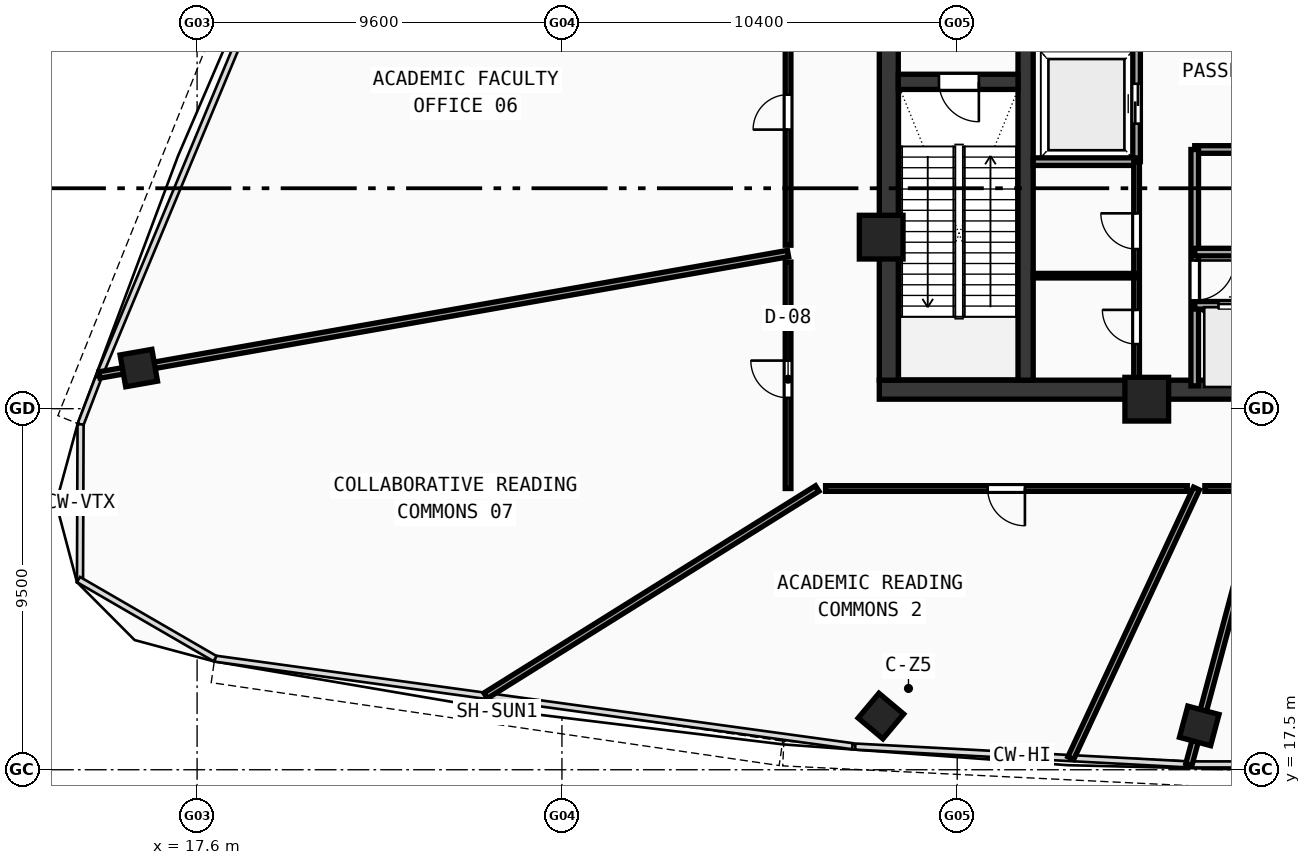
"""IFC4 building model, lengths in metres.
Left out: names, types, materials, properties, quantities, classifications, styles, units other than length and angle.
Written with IfcOpenShell. Run it as: python <this file> out.ifc"""

import sys

from ifc_helpers import new_model, si_unit, direction, frame, frame_2d, origin, origin_with_axes, origin_2d, place, context, subcontext, project, spatial, rectangle, hollow_rectangle, extrude, source, transform, mapped, element, fill, save


model = new_model("IFC4")
c1 = context("Model", 3, precision=1e-05, world=origin(), true_north=direction((0.0, 1.0)))
c2 = subcontext(c1, "Body", "Model", "MODEL_VIEW")
j1 = project(units=[si_unit("LENGTHUNIT", "METRE"), si_unit("PLANEANGLEUNIT", "RADIAN")], contexts=[c1])
p1 = place(None, origin())
s1 = spatial("IfcSite", under=j1, at=p1, CompositionType="ELEMENT")
p2 = place(p1, origin())
s2 = spatial("IfcBuilding", under=s1, at=p2, CompositionType="ELEMENT")
p3 = place(p2, frame((0.0, 0.0, 266.91)))
s3 = spatial("IfcBuildingStorey", under=s2, at=p3, CompositionType="ELEMENT", Elevation=266.91)
p4 = place(p3, frame((35.55, 27.5, 0.0), z_axis=(0.0, 0.0, 1.0), x_axis=(1.0, 0.0, 0.0)))
e1 = element("IfcWall", 1, at=p4, inside=s3, PredefinedType="SHEAR", context=c2, shape_type="SweptSolid", body=[
    extrude(rectangle(XDim=24.9, YDim=0.5, at=frame_2d((12.45, 0.0))), origin(), (0.0, 0.0, 1.0), 5.57),
])
p5 = place(p3, frame((35.8, 27.75, 0.0), z_axis=(0.0, 0.0, 1.0), x_axis=(0.0, 1.0, 0.0)))
e2 = element("IfcWall", 2, at=p5, inside=s3, PredefinedType="SHEAR", context=c2, shape_type="SweptSolid", body=[
    extrude(rectangle(XDim=12.2, YDim=0.5, at=frame_2d((6.1, 0.0))), origin(), (0.0, 0.0, 1.0), 5.57),
])
p6 = place(p3, frame((39.4, 27.75, 0.0), z_axis=(0.0, 0.0, 1.0), x_axis=(0.0, 1.0, 0.0)))
e3 = element("IfcWall", 3, at=p6, inside=s3, PredefinedType="SHEAR", context=c2, shape_type="SweptSolid", body=[
    extrude(rectangle(XDim=12.2, YDim=0.4, at=frame_2d((6.1, 0.0))), origin(), (0.0, 0.0, 1.0), 5.57),
])
p7 = place(p6, frame((10.0, 0.0, 0.0)))
e4 = element("IfcOpeningElement", 4, at=p7, cuts=e3, PredefinedType="OPENING", context=c2, shape_type="SweptSolid", body=[
    extrude(rectangle(XDim=1.1, YDim=2.1, at=frame_2d((0.55, 1.05))), frame((0.0, 0.21, 0.0), z_axis=(0.0, -1.0, 0.0), x_axis=(1.0, 0.0, 0.0)), (0.0, 0.0, 1.0), 0.42),
])
p8 = place(p3, frame((36.05, 35.6, 0.0), z_axis=(0.0, 0.0, 1.0), x_axis=(1.0, 0.0, 0.0)))
e5 = element("IfcWall", 5, at=p8, inside=s3, PredefinedType="SHEAR", context=c2, shape_type="SweptSolid", body=[
    extrude(rectangle(XDim=3.15, YDim=0.4, at=frame_2d((1.575, 0.0))), origin(), (0.0, 0.0, 1.0), 5.57),
])
p9 = place(p8, frame((1.07, 0.0, 0.0)))
e6 = element("IfcOpeningElement", 6, at=p9, cuts=e5, PredefinedType="OPENING", context=c2, shape_type="SweptSolid", body=[
    extrude(rectangle(XDim=1.05, YDim=2.1, at=frame_2d((0.525, 1.05))), frame((0.0, 0.21, 0.0), z_axis=(0.0, -1.0, 0.0), x_axis=(1.0, 0.0, 0.0)), (0.0, 0.0, 1.0), 0.42),
])
m1 = source(origin(), c2, "Body", "SweptSolid", [
    extrude(hollow_rectangle(XDim=1.15, YDim=1.15, WallThickness=0.048, at=origin_2d()), origin(), (0.0, 0.0, 1.0), 5.83),
])
for number, where, z_axis, x_axis in (
    (7, (42.588, 27.25, -0.26), (0.0, 0.0, 1.0), (1.0, 0.0, 0.0)),
    (8, (35.6, 31.513, -0.26), (0.0, 0.0, 1.0), (1.0, 0.0, 0.0)),
):
    element("IfcColumn", number, at=place(p3, frame(where, z_axis=z_axis, x_axis=x_axis)), inside=s3, PredefinedType="COLUMN", context=c2, shape_type="MappedRepresentation", body=[
        mapped(m1, transform((0.0, 0.0, 0.0), scale=1.0)),
    ])
m2 = source(origin(), c2, "Body", "SweptSolid", [
    extrude(hollow_rectangle(XDim=0.85, YDim=0.85, WallThickness=0.034, at=origin_2d()), origin(), (0.0, 0.0, 1.0), 5.83),
])
for number, where, z_axis, x_axis in (
    (9, (35.593, 18.914, -0.26), (0.0, 0.0, 1.0), (0.766, -0.643, 0.0)),
    (10, (43.969, 18.654, -0.26), (0.0, 0.0, 1.0), (0.966, -0.259, 0.0)),
    (11, (16.066, 28.069, -0.26), (0.0, 0.0, 1.0), (0.174, -0.985, 0.0)),
):
    element("IfcColumn", number, at=place(p3, frame(where, z_axis=z_axis, x_axis=x_axis)), inside=s3, PredefinedType="COLUMN", context=c2, shape_type="MappedRepresentation", body=[
        mapped(m2, transform((0.0, 0.0, 0.0), scale=1.0)),
    ])
p10 = place(p3, frame((42.32, 33.5, 0.0), z_axis=(0.0, 0.0, 1.0), x_axis=(0.0, 1.0, 0.0)))
e12 = element("IfcWall", 12, at=p10, inside=s3, PredefinedType="SOLIDWALL", context=c2, shape_type="SweptSolid", body=[
    extrude(rectangle(XDim=6.45, YDim=0.2, at=frame_2d((3.225, 0.0))), origin(), (0.0, 0.0, 1.0), 5.57),
])
p11 = place(p10, frame((1.0, 0.0, 0.0)))
e13 = element("IfcOpeningElement", 13, at=p11, cuts=e12, PredefinedType="OPENING", context=c2, shape_type="SweptSolid", body=[
    extrude(rectangle(XDim=1.05, YDim=2.1, at=frame_2d((0.525, 1.05))), frame((0.0, 0.11, 0.0), z_axis=(0.0, -1.0, 0.0), x_axis=(1.0, 0.0, 0.0)), (0.0, 0.0, 1.0), 0.22),
])
p12 = place(p3, frame((39.6, 33.5, 0.0), z_axis=(0.0, 0.0, 1.0), x_axis=(1.0, 0.0, 0.0)))
e14 = element("IfcWall", 14, at=p12, inside=s3, PredefinedType="SOLIDWALL", context=c2, shape_type="SweptSolid", body=[
    extrude(rectangle(XDim=2.72, YDim=0.2, at=frame_2d((1.36, 0.0))), origin(), (0.0, 0.0, 1.0), 5.57),
])
p13 = place(p3, frame((43.85, 33.82, 0.0), z_axis=(0.0, 0.0, 1.0), x_axis=(1.0, 0.0, 0.0)))
e15 = element("IfcWall", 15, at=p13, inside=s3, PredefinedType="SOLIDWALL", context=c2, shape_type="SweptSolid", body=[
    extrude(rectangle(XDim=9.83, YDim=0.2, at=frame_2d((4.915, 0.0))), origin(), (0.0, 0.0, 1.0), 5.57),
])
p14 = place(p13, frame((1.2, 0.0, 0.0)))
e16 = element("IfcOpeningElement", 16, at=p14, cuts=e15, PredefinedType="OPENING", context=c2, shape_type="SweptSolid", body=[
    extrude(rectangle(XDim=0.9, YDim=2.1, at=frame_2d((0.45, 1.05))), frame((0.0, 0.11, 0.0), z_axis=(0.0, -1.0, 0.0), x_axis=(1.0, 0.0, 0.0)), (0.0, 0.0, 1.0), 0.22),
])
p15 = place(p13, frame((4.6, 0.0, 0.0)))
e17 = element("IfcOpeningElement", 17, at=p15, cuts=e15, PredefinedType="OPENING", context=c2, shape_type="SweptSolid", body=[
    extrude(rectangle(XDim=0.9, YDim=2.1, at=frame_2d((0.45, 1.05))), frame((0.0, 0.11, 0.0), z_axis=(0.0, -1.0, 0.0), x_axis=(1.0, 0.0, 0.0)), (0.0, 0.0, 1.0), 0.22),
])
p16 = place(p3, frame((43.85, 27.6, 0.0), z_axis=(0.0, 0.0, 1.0), x_axis=(0.0, 1.0, 0.0)))
e18 = element("IfcWall", 18, at=p16, inside=s3, PredefinedType="SOLIDWALL", context=c2, shape_type="SweptSolid", body=[
    extrude(rectangle(XDim=6.22, YDim=0.2, at=frame_2d((3.11, 0.0))), origin(), (0.0, 0.0, 1.0), 5.57),
])
p17 = place(p16, frame((2.25, 0.0, 0.0)))
e19 = element("IfcOpeningElement", 19, at=p17, cuts=e18, PredefinedType="OPENING", context=c2, shape_type="SweptSolid", body=[
    extrude(rectangle(XDim=1.05, YDim=2.1, at=frame_2d((0.525, 1.05))), frame((0.0, 0.11, 0.0), z_axis=(0.0, -1.0, 0.0), x_axis=(1.0, 0.0, 0.0)), (0.0, 0.0, 1.0), 0.22),
])
p18 = place(p3, frame((43.85, 29.72, 0.0), z_axis=(0.0, 0.0, 1.0), x_axis=(1.0, 0.0, 0.0)))
e20 = element("IfcWall", 20, at=p18, inside=s3, PredefinedType="SOLIDWALL", context=c2, shape_type="SweptSolid", body=[
    extrude(rectangle(XDim=7.2, YDim=0.2, at=frame_2d((3.6, 0.0))), origin(), (0.0, 0.0, 1.0), 5.57),
])
p19 = place(p18, frame((0.625, 0.0, 0.0)))
e21 = element("IfcOpeningElement", 21, at=p19, cuts=e20, PredefinedType="OPENING", context=c2, shape_type="SweptSolid", body=[
    extrude(rectangle(XDim=1.05, YDim=2.1, at=frame_2d((0.525, 1.05))), frame((0.0, 0.11, 0.0), z_axis=(0.0, -1.0, 0.0), x_axis=(1.0, 0.0, 0.0)), (0.0, 0.0, 1.0), 0.22),
])
p20 = place(p18, frame((3.075, 0.0, 0.0)))
e22 = element("IfcOpeningElement", 22, at=p20, cuts=e20, PredefinedType="OPENING", context=c2, shape_type="SweptSolid", body=[
    extrude(rectangle(XDim=1.05, YDim=2.1, at=frame_2d((0.525, 1.05))), frame((0.0, 0.11, 0.0), z_axis=(0.0, -1.0, 0.0), x_axis=(1.0, 0.0, 0.0)), (0.0, 0.0, 1.0), 0.22),
])
p21 = place(p18, frame((5.525, 0.0, 0.0)))
e23 = element("IfcOpeningElement", 23, at=p21, cuts=e20, PredefinedType="OPENING", context=c2, shape_type="SweptSolid", body=[
    extrude(rectangle(XDim=1.05, YDim=2.1, at=frame_2d((0.525, 1.05))), frame((0.0, 0.11, 0.0), z_axis=(0.0, -1.0, 0.0), x_axis=(1.0, 0.0, 0.0)), (0.0, 0.0, 1.0), 0.22),
])
p22 = place(p3, frame((43.85, 31.12, 0.0), z_axis=(0.0, 0.0, 1.0), x_axis=(1.0, 0.0, 0.0)))
e24 = element("IfcWall", 24, at=p22, inside=s3, PredefinedType="SOLIDWALL", context=c2, shape_type="SweptSolid", body=[
    extrude(rectangle(XDim=9.83, YDim=0.2, at=frame_2d((4.915, 0.0))), origin(), (0.0, 0.0, 1.0), 5.57),
])
p23 = place(p3, frame((42.32, 27.6, 0.0), z_axis=(0.0, 0.0, 1.0), x_axis=(0.0, 1.0, 0.0)))
e25 = element("IfcWall", 25, at=p23, inside=s3, PredefinedType="PARTITIONING", context=c2, shape_type="SweptSolid", body=[
    extrude(rectangle(XDim=5.9, YDim=0.15, at=frame_2d((2.95, 0.0))), origin(), (0.0, 0.0, 1.0), 2.22),
])
p24 = place(p23, frame((1.1, 0.0, 0.0)))
e26 = element("IfcOpeningElement", 26, at=p24, cuts=e25, PredefinedType="OPENING", context=c2, shape_type="SweptSolid", body=[
    extrude(rectangle(XDim=0.9, YDim=2.1, at=frame_2d((0.45, 1.05))), frame((0.0, 0.085, 0.0), z_axis=(0.0, -1.0, 0.0), x_axis=(1.0, 0.0, 0.0)), (0.0, 0.0, 1.0), 0.17),
])
p25 = place(p23, frame((3.6, 0.0, 0.0)))
e27 = element("IfcOpeningElement", 27, at=p25, cuts=e25, PredefinedType="OPENING", context=c2, shape_type="SweptSolid", body=[
    extrude(rectangle(XDim=0.94, YDim=2.1, at=frame_2d((0.47, 1.05))), frame((0.0, 0.085, 0.0), z_axis=(0.0, -1.0, 0.0), x_axis=(1.0, 0.0, 0.0)), (0.0, 0.0, 1.0), 0.17),
])
p26 = place(p3, frame((39.6, 30.5, 0.0), z_axis=(0.0, 0.0, 1.0), x_axis=(1.0, 0.0, 0.0)))
e28 = element("IfcWall", 28, at=p26, inside=s3, PredefinedType="PARTITIONING", context=c2, shape_type="SweptSolid", body=[
    extrude(rectangle(XDim=2.72, YDim=0.12, at=frame_2d((1.36, 0.0))), origin(), (0.0, 0.0, 1.0), 5.57),
])
p27 = place(p3, frame((33.15, 31.082, 0.0), z_axis=(0.0, 0.0, 1.0), x_axis=(-0.984806394916, -0.173655879639, 0.0)))
e29 = element("IfcWall", 29, at=p27, inside=s3, PredefinedType="PARTITIONING", context=c2, shape_type="SweptSolid", body=[
    extrude(rectangle(XDim=18.397, YDim=0.17, at=frame_2d((9.199, 0.0))), origin(), (0.0, 0.0, 1.0), 2.22),
])
p28 = place(p3, frame((33.917, 24.9, 0.0), z_axis=(0.0, 0.0, 1.0), x_axis=(-0.848046300914, -0.529922137211, 0.0)))
e30 = element("IfcWall", 30, at=p28, inside=s3, PredefinedType="PARTITIONING", context=c2, shape_type="SweptSolid", body=[
    extrude(rectangle(XDim=10.287, YDim=0.17, at=frame_2d((5.143, 0.0))), origin(), (0.0, 0.0, 1.0), 4.92),
])
p29 = place(p3, frame((43.896, 24.9, 0.0), z_axis=(0.0, 0.0, 1.0), x_axis=(-0.422631029952, -0.906301833012, 0.0)))
e31 = element("IfcWall", 31, at=p29, inside=s3, PredefinedType="PARTITIONING", context=c2, shape_type="SweptSolid", body=[
    extrude(rectangle(XDim=7.827, YDim=0.17, at=frame_2d((3.914, 0.0))), origin(), (0.0, 0.0, 1.0), 4.92),
])
p30 = place(p3, frame((45.642, 24.9, 0.0), z_axis=(0.0, 0.0, 1.0), x_axis=(-0.258810769147, -0.965928043787, 0.0)))
e32 = element("IfcWall", 32, at=p30, inside=s3, PredefinedType="PARTITIONING", context=c2, shape_type="SweptSolid", body=[
    extrude(rectangle(XDim=7.516, YDim=0.17, at=frame_2d((3.758, 0.0))), origin(), (0.0, 0.0, 1.0), 2.22),
])
p31 = place(p3, frame((33.15, 24.9, 0.0), z_axis=(0.0, 0.0, 1.0), x_axis=(0.0, 1.0, 0.0)))
e33 = element("IfcWall", 33, at=p31, inside=s3, PredefinedType="PARTITIONING", context=c2, shape_type="SweptSolid", body=[
    extrude(rectangle(XDim=5.958, YDim=0.15, at=frame_2d((2.979, 0.0))), origin(), (0.0, 0.0, 1.0), 2.22),
])
p32 = place(p31, frame((2.386, 0.0, 0.0)))
e34 = element("IfcOpeningElement", 34, at=p32, cuts=e33, PredefinedType="OPENING", context=c2, shape_type="SweptSolid", body=[
    extrude(rectangle(XDim=0.98, YDim=2.12, at=frame_2d((0.49, 1.06))), frame((0.0, 0.085, 0.0), z_axis=(0.0, -1.0, 0.0), x_axis=(1.0, 0.0, 0.0)), (0.0, 0.0, 1.0), 0.17),
])
p33 = place(p3, frame((33.15, 31.301, 0.0), z_axis=(0.0, 0.0, 1.0), x_axis=(0.0, 1.0, 0.0)))
e35 = element("IfcWall", 35, at=p33, inside=s3, PredefinedType="PARTITIONING", context=c2, shape_type="SweptSolid", body=[
    extrude(rectangle(XDim=7.004, YDim=0.15, at=frame_2d((3.502, 0.0))), origin(), (0.0, 0.0, 1.0), 2.22),
])
p34 = place(p33, frame((3.042, 0.0, 0.0)))
e36 = element("IfcOpeningElement", 36, at=p34, cuts=e35, PredefinedType="OPENING", context=c2, shape_type="SweptSolid", body=[
    extrude(rectangle(XDim=0.92, YDim=2.1, at=frame_2d((0.46, 1.05))), frame((0.0, 0.085, 0.0), z_axis=(0.0, -1.0, 0.0), x_axis=(1.0, 0.0, 0.0)), (0.0, 0.0, 1.0), 0.17),
])
p35 = place(p3, frame((45.414, 24.9, 0.0), z_axis=(0.0, 0.0, 1.0), x_axis=(-1.0, 0.0, 0.0)))
e37 = element("IfcWall", 37, at=p35, inside=s3, PredefinedType="PARTITIONING", context=c2, shape_type="SweptSolid", body=[
    extrude(rectangle(XDim=1.298, YDim=0.15, at=frame_2d((0.649, 0.0))), origin(), (0.0, 0.0, 1.0), 2.22),
])
p36 = place(p3, frame((43.654, 24.9, 0.0), z_axis=(0.0, 0.0, 1.0), x_axis=(-1.0, 0.0, 0.0)))
e38 = element("IfcWall", 38, at=p36, inside=s3, PredefinedType="PARTITIONING", context=c2, shape_type="SweptSolid", body=[
    extrude(rectangle(XDim=9.517, YDim=0.15, at=frame_2d((4.758, 0.0))), origin(), (0.0, 0.0, 1.0), 2.22),
])
p37 = place(p36, frame((4.272, 0.0, 0.0)))
e39 = element("IfcOpeningElement", 39, at=p37, cuts=e38, PredefinedType="OPENING", context=c2, shape_type="SweptSolid", body=[
    extrude(rectangle(XDim=0.98, YDim=2.12, at=frame_2d((0.49, 1.06))), frame((0.0, 0.085, 0.0), z_axis=(0.0, -1.0, 0.0), x_axis=(1.0, 0.0, 0.0)), (0.0, 0.0, 1.0), 0.17),
])
m3 = source(origin(), c2, "Body", "SweptSolid", [
    extrude(rectangle(XDim=1.05, YDim=2.1, at=frame_2d((0.525, 1.05))), frame((0.0, 0.025, 0.0), z_axis=(0.0, -1.0, 0.0), x_axis=(1.0, 0.0, 0.0)), (0.0, 0.0, 1.0), 0.05),
])
p38 = place(p9, frame((1.05, 0.0, 0.0), z_axis=(0.0, 0.0, 1.0), x_axis=(-1.0, 0.0, 0.0)))
e40 = element("IfcDoor", 40, at=p38, inside=s3, OperationType="SINGLE_SWING_LEFT", PredefinedType="DOOR", context=c2, shape_type="MappedRepresentation", body=[
    mapped(m3, transform((0.0, 0.0, 0.0), scale=1.0)),
])
fill(e6, e40)
p39 = place(p11, origin_with_axes())
e41 = element("IfcDoor", 41, at=p39, inside=s3, OperationType="DOUBLE_DOOR_SLIDING", PredefinedType="DOOR", context=c2, shape_type="MappedRepresentation", body=[
    mapped(m3, transform((0.0, 0.0, 0.0), scale=1.0)),
])
fill(e13, e41)
p40 = place(p17, frame((1.05, 0.0, 0.0), z_axis=(0.0, 0.0, 1.0), x_axis=(-1.0, 0.0, 0.0)))
e42 = element("IfcDoor", 42, at=p40, inside=s3, OperationType="SINGLE_SWING_LEFT", PredefinedType="DOOR", context=c2, shape_type="MappedRepresentation", body=[
    mapped(m3, transform((0.0, 0.0, 0.0), scale=1.0)),
])
fill(e19, e42)
p41 = place(p19, origin_with_axes())
e43 = element("IfcDoor", 43, at=p41, inside=s3, OperationType="DOUBLE_DOOR_SLIDING", PredefinedType="DOOR", context=c2, shape_type="MappedRepresentation", body=[
    mapped(m3, transform((0.0, 0.0, 0.0), scale=1.0)),
])
fill(e21, e43)
m4 = source(origin(), c2, "Body", "SweptSolid", [
    extrude(rectangle(XDim=0.9, YDim=2.1, at=frame_2d((0.45, 1.05))), frame((0.0, 0.025, 0.0), z_axis=(0.0, -1.0, 0.0), x_axis=(1.0, 0.0, 0.0)), (0.0, 0.0, 1.0), 0.05),
])
p42 = place(p24, origin_with_axes())
e44 = element("IfcDoor", 44, at=p42, inside=s3, OperationType="SINGLE_SWING_RIGHT", PredefinedType="DOOR", context=c2, shape_type="MappedRepresentation", body=[
    mapped(m4, transform((0.0, 0.0, 0.0), scale=1.0)),
])
fill(e26, e44)
m5 = source(origin(), c2, "Body", "SweptSolid", [
    extrude(rectangle(XDim=0.94, YDim=2.1, at=frame_2d((0.47, 1.05))), frame((0.0, 0.025, 0.0), z_axis=(0.0, -1.0, 0.0), x_axis=(1.0, 0.0, 0.0)), (0.0, 0.0, 1.0), 0.05),
])
p43 = place(p25, origin_with_axes())
e45 = element("IfcDoor", 45, at=p43, inside=s3, OperationType="SINGLE_SWING_RIGHT", PredefinedType="DOOR", context=c2, shape_type="MappedRepresentation", body=[
    mapped(m5, transform((0.0, 0.0, 0.0), scale=1.0)),
])
fill(e27, e45)
m6 = source(origin(), c2, "Body", "SweptSolid", [
    extrude(rectangle(XDim=0.92, YDim=2.1, at=frame_2d((0.46, 1.05))), frame((0.0, 0.025, 0.0), z_axis=(0.0, -1.0, 0.0), x_axis=(1.0, 0.0, 0.0)), (0.0, 0.0, 1.0), 0.05),
])
p44 = place(p34, origin_with_axes())
e46 = element("IfcDoor", 46, at=p44, inside=s3, OperationType="SINGLE_SWING_LEFT", PredefinedType="DOOR", context=c2, shape_type="MappedRepresentation", body=[
    mapped(m6, transform((0.0, 0.0, 0.0), scale=1.0)),
])
fill(e36, e46)
m7 = source(origin(), c2, "Body", "SweptSolid", [
    extrude(rectangle(XDim=0.98, YDim=2.12, at=frame_2d((0.49, 1.06))), frame((0.0, 0.025, 0.0), z_axis=(0.0, -1.0, 0.0), x_axis=(1.0, 0.0, 0.0)), (0.0, 0.0, 1.0), 0.05),
])
p45 = place(p32, origin_with_axes())
e47 = element("IfcDoor", 47, at=p45, inside=s3, OperationType="SINGLE_SWING_RIGHT", PredefinedType="DOOR", context=c2, shape_type="MappedRepresentation", body=[
    mapped(m7, transform((0.0, 0.0, 0.0), scale=1.0)),
])
fill(e34, e47)
p46 = place(p37, origin_with_axes())
e48 = element("IfcDoor", 48, at=p46, inside=s3, OperationType="SINGLE_SWING_LEFT", PredefinedType="DOOR", context=c2, shape_type="MappedRepresentation", body=[
    mapped(m7, transform((0.0, 0.0, 0.0), scale=1.0)),
])
fill(e39, e48)
save(model, sys.argv[1])
